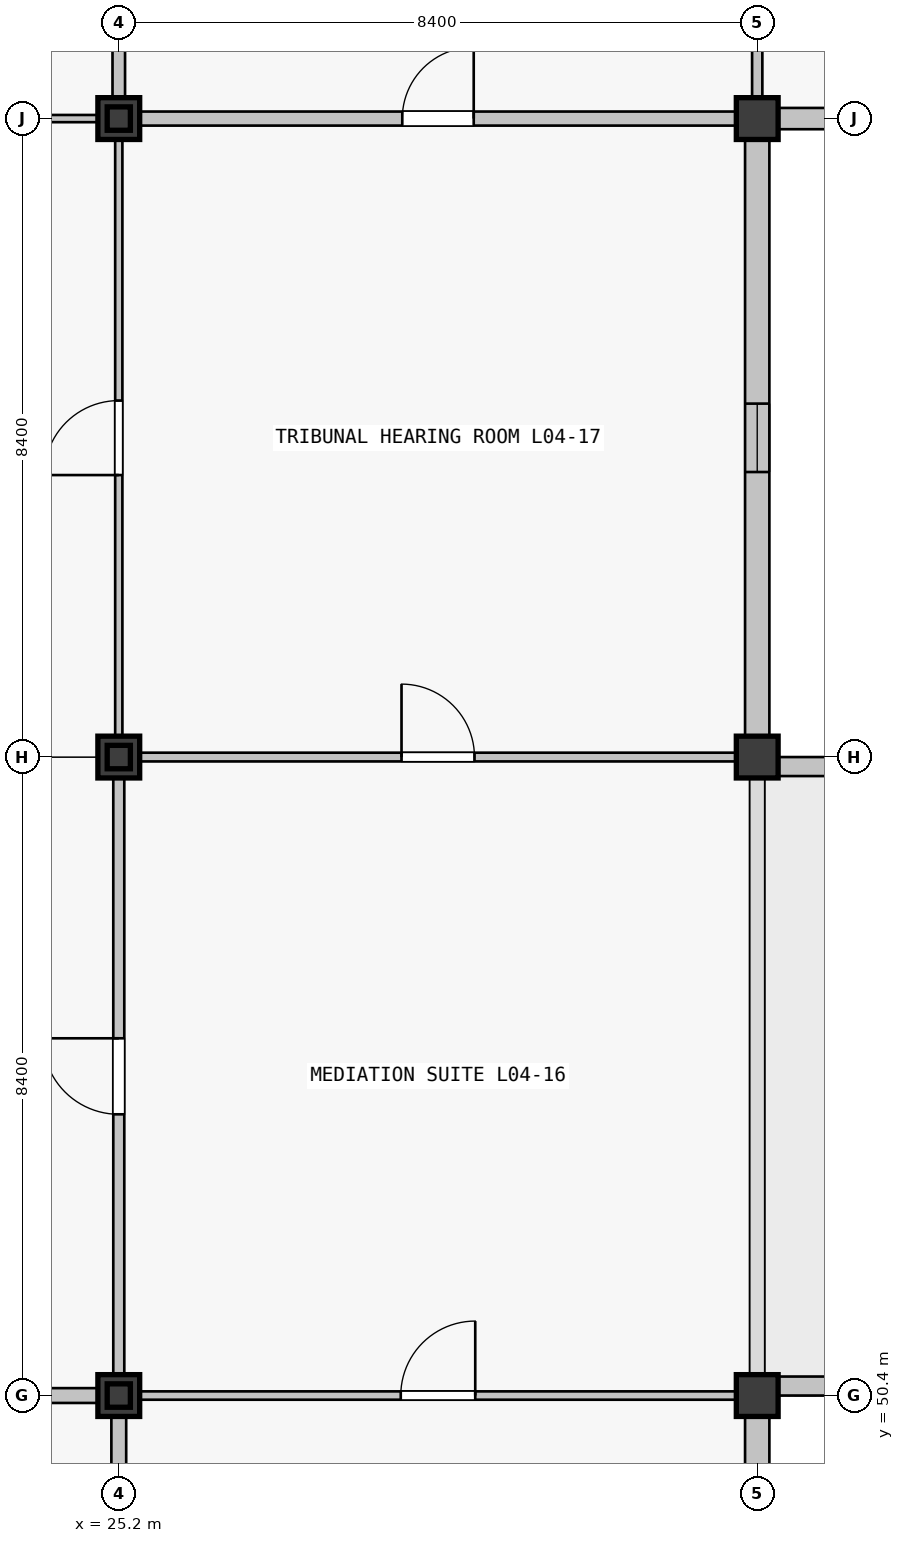
"""IFC4 building model, lengths in metres.
Left out: names, types, materials, properties, quantities, classifications, styles, units other than length and angle.
Written with IfcOpenShell. Run it as: python <this file> out.ifc"""

import sys

from ifc_helpers import new_model, si_unit, direction, frame, frame_2d, origin, origin_2d, place, context, subcontext, project, spatial, rectangle, i_section, extrude, element, fill, save


model = new_model("IFC4")
c1 = context("Model", 3, precision=1e-05, world=origin(), true_north=direction((0.0, 1.0)))
c2 = subcontext(c1, "Body", "Model", "MODEL_VIEW")
j1 = project(units=[si_unit("LENGTHUNIT", "METRE"), si_unit("PLANEANGLEUNIT", "RADIAN")], contexts=[c1])
p1 = place(None, origin())
s1 = spatial("IfcSite", under=j1, at=p1, CompositionType="ELEMENT")
p2 = place(p1, origin())
s2 = spatial("IfcBuilding", under=s1, at=p2, CompositionType="ELEMENT")
p3 = place(p2, frame((0.0, 0.0, 19.08)))
s3 = spatial("IfcBuildingStorey", under=s2, at=p3, CompositionType="ELEMENT", Elevation=19.08)
for number, where, z_axis, x_axis in (
    (1, (25.2, 50.4, 0.0), (0.0, 0.0, 1.0), (1.0, 0.0, 0.0)),
    (2, (25.2, 58.8, 0.0), (0.0, 0.0, 1.0), (1.0, 0.0, 0.0)),
    (3, (25.2, 67.2, 0.0), (0.0, 0.0, 1.0), (1.0, 0.0, 0.0)),
    (4, (33.6, 50.4, 0.0), (0.0, 0.0, 1.0), (1.0, 0.0, 0.0)),
    (5, (33.6, 58.8, 0.0), (0.0, 0.0, 1.0), (1.0, 0.0, 0.0)),
    (6, (33.6, 67.2, 0.0), (0.0, 0.0, 1.0), (1.0, 0.0, 0.0)),
):
    element("IfcColumn", number, at=place(p3, frame(where, z_axis=z_axis, x_axis=x_axis)), inside=s3, PredefinedType="COLUMN", context=c2, shape_type="SweptSolid", body=[
        extrude(rectangle(XDim=0.55, YDim=0.55, at=origin_2d()), origin(), (0.0, 0.0, 1.0), 4.16),
    ])
for number, where, z_axis, x_axis in (
    (7, (25.2, 50.4, 4.16), (0.0, 0.0, 1.0), (1.0, 0.0, 0.0)),
    (8, (25.2, 58.8, 4.16), (0.0, 0.0, 1.0), (1.0, 0.0, 0.0)),
    (9, (25.2, 67.2, 4.16), (0.0, 0.0, 1.0), (1.0, 0.0, 0.0)),
):
    element("IfcColumn", number, at=place(p3, frame(where, z_axis=z_axis, x_axis=x_axis)), inside=s3, PredefinedType="COLUMN", context=c2, shape_type="SweptSolid", body=[
        extrude(i_section(OverallWidth=0.305, OverallDepth=0.308, WebThickness=0.01, FlangeThickness=0.015, FilletRadius=0.017, at=origin_2d()), origin(), (0.0, 0.0, 1.0), 1.925),
    ])
p4 = place(p3, frame((33.6, 50.124, 0.0), z_axis=(0.0, 0.0, 1.0), x_axis=(0.0, -1.0, 0.0)))
e10 = element("IfcWall", 10, at=p4, inside=s3, PredefinedType="SOLIDWALL", context=c2, shape_type="SweptSolid", body=[
    extrude(rectangle(XDim=7.848, YDim=0.32, at=frame_2d((3.924, 0.0))), origin(), (0.0, 0.0, 1.0), 3.37),
])
p5 = place(p4, frame((3.174, 0.0, 0.9)))
e11 = element("IfcOpeningElement", 11, at=p5, cuts=e10, PredefinedType="OPENING", context=c2, shape_type="SweptSolid", body=[
    extrude(rectangle(XDim=1.5, YDim=1.2, at=frame_2d((0.75, 0.6))), frame((0.0, 0.16, 0.0), z_axis=(0.0, -1.0, 0.0), x_axis=(1.0, 0.0, 0.0)), (0.0, 0.0, 1.0), 0.32),
])
p6 = place(p3, frame((33.6, 66.924, 0.0), z_axis=(0.0, 0.0, 1.0), x_axis=(0.0, -1.0, 0.0)))
e12 = element("IfcWall", 12, at=p6, inside=s3, PredefinedType="SOLIDWALL", context=c2, shape_type="SweptSolid", body=[
    extrude(rectangle(XDim=7.848, YDim=0.32, at=frame_2d((3.924, 0.0))), origin(), (0.0, 0.0, 1.0), 3.37),
])
p7 = place(p6, frame((3.474, 0.0, 0.9)))
e13 = element("IfcOpeningElement", 13, at=p7, cuts=e12, PredefinedType="OPENING", context=c2, shape_type="SweptSolid", body=[
    extrude(rectangle(XDim=0.9, YDim=1.5, at=frame_2d((0.45, 0.75))), frame((0.0, 0.16, 0.0), z_axis=(0.0, -1.0, 0.0), x_axis=(1.0, 0.0, 0.0)), (0.0, 0.0, 1.0), 0.32),
])
p8 = place(p3, frame((41.724, 67.2, 0.0), z_axis=(0.0, 0.0, 1.0), x_axis=(-1.0, 0.0, 0.0)))
e14 = element("IfcWall", 14, at=p8, inside=s3, PredefinedType="SOLIDWALL", context=c2, shape_type="SweptSolid", body=[
    extrude(rectangle(XDim=7.848, YDim=0.28, at=frame_2d((3.924, 0.0))), origin(), (0.0, 0.0, 1.0), 3.37),
])
p9 = place(p8, frame((2.774, 0.0, 0.9)))
e15 = element("IfcOpeningElement", 15, at=p9, cuts=e14, PredefinedType="OPENING", context=c2, shape_type="SweptSolid", body=[
    extrude(rectangle(XDim=2.3, YDim=1.85, at=frame_2d((1.15, 0.925))), frame((0.0, 0.14, 0.0), z_axis=(0.0, -1.0, 0.0), x_axis=(1.0, 0.0, 0.0)), (0.0, 0.0, 1.0), 0.28),
])
for number, where, z_axis, x_axis in (
    (16, (41.74, 50.525, 0.0), (0.0, 0.0, 1.0), (-1.0, 0.0, 0.0)),
    (17, (33.86, 58.675, 0.0), (0.0, 0.0, 1.0), (1.0, 0.0, 0.0)),
):
    element("IfcWall", number, at=place(p3, frame(where, z_axis=z_axis, x_axis=x_axis)), inside=s3, PredefinedType="PARAPET", context=c2, shape_type="SweptSolid", body=[
        extrude(rectangle(XDim=7.88, YDim=0.25, at=frame_2d((3.94, 0.0))), origin(), (0.0, 0.0, 1.0), 0.95),
    ])
p10 = place(p3, frame((17.077, 50.4, 0.0), z_axis=(0.0, 0.0, 1.0), x_axis=(1.0, 0.0, 0.0)))
e18 = element("IfcWall", 18, at=p10, inside=s3, PredefinedType="PARTITIONING", context=c2, shape_type="SweptSolid", body=[
    extrude(rectangle(XDim=7.846, YDim=0.195, at=frame_2d((3.923, 0.0))), origin(), (0.0, 0.0, 1.0), 3.19),
])
p11 = place(p10, frame((0.718, 0.0, 0.0)))
e19 = element("IfcOpeningElement", 19, at=p11, cuts=e18, PredefinedType="OPENING", context=c2, shape_type="SweptSolid", body=[
    extrude(rectangle(XDim=0.94, YDim=2.08, at=frame_2d((0.47, 1.04))), frame((0.0, 0.098, 0.0), z_axis=(0.0, -1.0, 0.0), x_axis=(1.0, 0.0, 0.0)), (0.0, 0.0, 1.0), 0.195),
])
p12 = place(p10, frame((4.628, 0.0, 0.0)))
e20 = element("IfcOpeningElement", 20, at=p12, cuts=e18, PredefinedType="OPENING", context=c2, shape_type="SweptSolid", body=[
    extrude(rectangle(XDim=0.96, YDim=2.1, at=frame_2d((0.48, 1.05))), frame((0.0, 0.098, 0.0), z_axis=(0.0, -1.0, 0.0), x_axis=(1.0, 0.0, 0.0)), (0.0, 0.0, 1.0), 0.195),
])
p13 = place(p3, frame((17.077, 67.2, 0.0), z_axis=(0.0, 0.0, 1.0), x_axis=(1.0, 0.0, 0.0)))
e21 = element("IfcWall", 21, at=p13, inside=s3, PredefinedType="PARTITIONING", context=c2, shape_type="SweptSolid", body=[
    extrude(rectangle(XDim=7.846, YDim=0.095, at=frame_2d((3.923, 0.0))), origin(), (0.0, 0.0, 1.0), 3.19),
])
p14 = place(p13, frame((3.458, 0.0, 0.0)))
e22 = element("IfcOpeningElement", 22, at=p14, cuts=e21, PredefinedType="OPENING", context=c2, shape_type="SweptSolid", body=[
    extrude(rectangle(XDim=0.93, YDim=2.12, at=frame_2d((0.465, 1.06))), frame((0.0, 0.047, 0.0), z_axis=(0.0, -1.0, 0.0), x_axis=(1.0, 0.0, 0.0)), (0.0, 0.0, 1.0), 0.095),
])
p15 = place(p3, frame((25.477, 50.4, 0.0), z_axis=(0.0, 0.0, 1.0), x_axis=(1.0, 0.0, 0.0)))
e23 = element("IfcWall", 23, at=p15, inside=s3, PredefinedType="MOVABLE", context=c2, shape_type="SweptSolid", body=[
    extrude(rectangle(XDim=7.846, YDim=0.11, at=frame_2d((3.923, 0.0))), origin(), (0.0, 0.0, 1.0), 3.19),
])
p16 = place(p15, frame((3.433, 0.0, 0.0)))
e24 = element("IfcOpeningElement", 24, at=p16, cuts=e23, PredefinedType="OPENING", context=c2, shape_type="SweptSolid", body=[
    extrude(rectangle(XDim=0.98, YDim=2.18, at=frame_2d((0.49, 1.09))), frame((0.0, 0.055, 0.0), z_axis=(0.0, -1.0, 0.0), x_axis=(1.0, 0.0, 0.0)), (0.0, 0.0, 1.0), 0.11),
])
p17 = place(p3, frame((25.477, 58.8, 0.0), z_axis=(0.0, 0.0, 1.0), x_axis=(1.0, 0.0, 0.0)))
e25 = element("IfcWall", 25, at=p17, inside=s3, PredefinedType="PARTITIONING", context=c2, shape_type="SweptSolid", body=[
    extrude(rectangle(XDim=7.846, YDim=0.115, at=frame_2d((3.923, 0.0))), origin(), (0.0, 0.0, 1.0), 3.19),
])
p18 = place(p17, frame((3.443, 0.0, 0.0)))
e26 = element("IfcOpeningElement", 26, at=p18, cuts=e25, PredefinedType="OPENING", context=c2, shape_type="SweptSolid", body=[
    extrude(rectangle(XDim=0.96, YDim=2.18, at=frame_2d((0.48, 1.09))), frame((0.0, 0.058, 0.0), z_axis=(0.0, -1.0, 0.0), x_axis=(1.0, 0.0, 0.0)), (0.0, 0.0, 1.0), 0.115),
])
p19 = place(p3, frame((25.477, 67.2, 0.0), z_axis=(0.0, 0.0, 1.0), x_axis=(1.0, 0.0, 0.0)))
e27 = element("IfcWall", 27, at=p19, inside=s3, PredefinedType="PARTITIONING", context=c2, shape_type="SweptSolid", body=[
    extrude(rectangle(XDim=7.846, YDim=0.185, at=frame_2d((3.923, 0.0))), origin(), (0.0, 0.0, 1.0), 3.19),
])
p20 = place(p19, frame((3.453, 0.0, 0.0)))
e28 = element("IfcOpeningElement", 28, at=p20, cuts=e27, PredefinedType="OPENING", context=c2, shape_type="SweptSolid", body=[
    extrude(rectangle(XDim=0.94, YDim=2.15, at=frame_2d((0.47, 1.075))), frame((0.0, 0.093, 0.0), z_axis=(0.0, -1.0, 0.0), x_axis=(1.0, 0.0, 0.0)), (0.0, 0.0, 1.0), 0.185),
])
p21 = place(p3, frame((25.2, 42.277, 0.0), z_axis=(0.0, 0.0, 1.0), x_axis=(0.0, 1.0, 0.0)))
e29 = element("IfcWall", 29, at=p21, inside=s3, PredefinedType="PARTITIONING", context=c2, shape_type="SweptSolid", body=[
    extrude(rectangle(XDim=7.846, YDim=0.195, at=frame_2d((3.923, 0.0))), origin(), (0.0, 0.0, 1.0), 3.19),
])
p22 = place(p3, frame((25.2, 50.677, 0.0), z_axis=(0.0, 0.0, 1.0), x_axis=(0.0, 1.0, 0.0)))
e30 = element("IfcWall", 30, at=p22, inside=s3, PredefinedType="PARTITIONING", context=c2, shape_type="SweptSolid", body=[
    extrude(rectangle(XDim=7.846, YDim=0.145, at=frame_2d((3.923, 0.0))), origin(), (0.0, 0.0, 1.0), 3.19),
])
p23 = place(p22, frame((3.423, 0.0, 0.0)))
e31 = element("IfcOpeningElement", 31, at=p23, cuts=e30, PredefinedType="OPENING", context=c2, shape_type="SweptSolid", body=[
    extrude(rectangle(XDim=1.0, YDim=2.2, at=frame_2d((0.5, 1.1))), frame((0.0, 0.073, 0.0), z_axis=(0.0, -1.0, 0.0), x_axis=(1.0, 0.0, 0.0)), (0.0, 0.0, 1.0), 0.145),
])
p24 = place(p3, frame((25.2, 59.077, 0.0), z_axis=(0.0, 0.0, 1.0), x_axis=(0.0, 1.0, 0.0)))
e32 = element("IfcWall", 32, at=p24, inside=s3, PredefinedType="PARTITIONING", context=c2, shape_type="SweptSolid", body=[
    extrude(rectangle(XDim=7.846, YDim=0.095, at=frame_2d((3.923, 0.0))), origin(), (0.0, 0.0, 1.0), 3.19),
])
p25 = place(p24, frame((3.433, 0.0, 0.0)))
e33 = element("IfcOpeningElement", 33, at=p25, cuts=e32, PredefinedType="OPENING", context=c2, shape_type="SweptSolid", body=[
    extrude(rectangle(XDim=0.98, YDim=2.18, at=frame_2d((0.49, 1.09))), frame((0.0, 0.047, 0.0), z_axis=(0.0, -1.0, 0.0), x_axis=(1.0, 0.0, 0.0)), (0.0, 0.0, 1.0), 0.095),
])
p26 = place(p3, frame((25.2, 67.477, 0.0), z_axis=(0.0, 0.0, 1.0), x_axis=(0.0, 1.0, 0.0)))
e34 = element("IfcWall", 34, at=p26, inside=s3, PredefinedType="PARTITIONING", context=c2, shape_type="SweptSolid", body=[
    extrude(rectangle(XDim=7.846, YDim=0.165, at=frame_2d((3.923, 0.0))), origin(), (0.0, 0.0, 1.0), 3.19),
])
p27 = place(p26, frame((3.438, 0.0, 0.0)))
e35 = element("IfcOpeningElement", 35, at=p27, cuts=e34, PredefinedType="OPENING", context=c2, shape_type="SweptSolid", body=[
    extrude(rectangle(XDim=0.97, YDim=2.12, at=frame_2d((0.485, 1.06))), frame((0.0, 0.083, 0.0), z_axis=(0.0, -1.0, 0.0), x_axis=(1.0, 0.0, 0.0)), (0.0, 0.0, 1.0), 0.165),
])
p28 = place(p3, frame((33.6, 67.477, 0.0), z_axis=(0.0, 0.0, 1.0), x_axis=(0.0, 1.0, 0.0)))
e36 = element("IfcWall", 36, at=p28, inside=s3, PredefinedType="PARTITIONING", context=c2, shape_type="SweptSolid", body=[
    extrude(rectangle(XDim=7.846, YDim=0.135, at=frame_2d((3.923, 0.0))), origin(), (0.0, 0.0, 1.0), 3.19),
])
p29 = place(p28, frame((3.443, 0.0, 0.0)))
e37 = element("IfcOpeningElement", 37, at=p29, cuts=e36, PredefinedType="OPENING", context=c2, shape_type="SweptSolid", body=[
    extrude(rectangle(XDim=0.96, YDim=2.18, at=frame_2d((0.48, 1.09))), frame((0.0, 0.067, 0.0), z_axis=(0.0, -1.0, 0.0), x_axis=(1.0, 0.0, 0.0)), (0.0, 0.0, 1.0), 0.135),
])
p30 = place(p7, origin())
e38 = element("IfcWindow", 38, at=p30, inside=s3, PartitioningType="SINGLE_PANEL", PredefinedType="WINDOW", context=c2, shape_type="SweptSolid", body=[
    extrude(rectangle(XDim=0.9, YDim=1.5, at=frame_2d((0.45, 0.75))), frame((0.0, 0.03, 0.0), z_axis=(0.0, -1.0, 0.0), x_axis=(1.0, 0.0, 0.0)), (0.0, 0.0, 1.0), 0.06),
])
fill(e13, e38)
p31 = place(p23, origin())
e39 = element("IfcDoor", 39, at=p31, inside=s3, OperationType="SINGLE_SWING_RIGHT", PredefinedType="DOOR", context=c2, shape_type="SweptSolid", body=[
    extrude(rectangle(XDim=1.0, YDim=2.2, at=frame_2d((0.5, 1.1))), frame((0.0, 0.025, 0.0), z_axis=(0.0, -1.0, 0.0), x_axis=(1.0, 0.0, 0.0)), (0.0, 0.0, 1.0), 0.05),
])
fill(e31, e39)
p32 = place(p25, origin())
e40 = element("IfcDoor", 40, at=p32, inside=s3, OperationType="SINGLE_SWING_LEFT", PredefinedType="DOOR", context=c2, shape_type="SweptSolid", body=[
    extrude(rectangle(XDim=0.98, YDim=2.18, at=frame_2d((0.49, 1.09))), frame((0.0, 0.025, 0.0), z_axis=(0.0, -1.0, 0.0), x_axis=(1.0, 0.0, 0.0)), (0.0, 0.0, 1.0), 0.05),
])
fill(e33, e40)
p33 = place(p16, origin())
e41 = element("IfcDoor", 41, at=p33, inside=s3, OperationType="SINGLE_SWING_RIGHT", PredefinedType="DOOR", context=c2, shape_type="SweptSolid", body=[
    extrude(rectangle(XDim=0.98, YDim=2.18, at=frame_2d((0.49, 1.09))), frame((0.0, 0.025, 0.0), z_axis=(0.0, -1.0, 0.0), x_axis=(1.0, 0.0, 0.0)), (0.0, 0.0, 1.0), 0.05),
])
fill(e24, e41)
p34 = place(p18, origin())
e42 = element("IfcDoor", 42, at=p34, inside=s3, OperationType="SINGLE_SWING_LEFT", PredefinedType="DOOR", context=c2, shape_type="SweptSolid", body=[
    extrude(rectangle(XDim=0.96, YDim=2.18, at=frame_2d((0.48, 1.09))), frame((0.0, 0.025, 0.0), z_axis=(0.0, -1.0, 0.0), x_axis=(1.0, 0.0, 0.0)), (0.0, 0.0, 1.0), 0.05),
])
fill(e26, e42)
p35 = place(p20, origin())
e43 = element("IfcDoor", 43, at=p35, inside=s3, OperationType="SINGLE_SWING_RIGHT", PredefinedType="DOOR", context=c2, shape_type="SweptSolid", body=[
    extrude(rectangle(XDim=0.94, YDim=2.15, at=frame_2d((0.47, 1.075))), frame((0.0, 0.025, 0.0), z_axis=(0.0, -1.0, 0.0), x_axis=(1.0, 0.0, 0.0)), (0.0, 0.0, 1.0), 0.05),
])
fill(e28, e43)
save(model, sys.argv[1])
